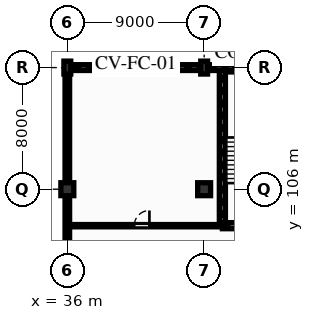
"""IFC4 building model, lengths in metres.
Left out: names, types, materials, properties, quantities, classifications, styles, units other than length and angle.
Written with IfcOpenShell. Run it as: python <this file> out.ifc"""

import sys

from ifc_helpers import new_model, si_unit, direction, frame, frame_2d, origin, origin_2d, place, context, subcontext, project, spatial, rectangle, extrude, element, fill, save


model = new_model("IFC4")
c1 = context("Model", 3, precision=1e-05, world=origin(), true_north=direction((0.0, 1.0)))
c2 = subcontext(c1, "Body", "Model", "MODEL_VIEW")
j1 = project(units=[si_unit("LENGTHUNIT", "METRE"), si_unit("PLANEANGLEUNIT", "RADIAN")], contexts=[c1])
p1 = place(None, origin())
s1 = spatial("IfcSite", under=j1, at=p1, CompositionType="ELEMENT")
p2 = place(p1, origin())
s2 = spatial("IfcBuilding", under=s1, at=p2, CompositionType="ELEMENT")
p3 = place(p2, frame((0.0, 0.0, 5.1)))
s3 = spatial("IfcBuildingStorey", under=s2, at=p3, CompositionType="ELEMENT", Elevation=5.1)
p4 = place(p3, frame((36.0, 106.0, 0.0), z_axis=(0.0, 0.0, 1.0), x_axis=(1.0, 0.0, 0.0)))
e1 = element("IfcColumn", 1, at=p4, inside=s3, PredefinedType="COLUMN", context=c2, shape_type="SweptSolid", body=[
    extrude(rectangle(XDim=0.85, YDim=0.85, at=origin_2d()), origin(), (0.0, 0.0, 1.0), 3.84),
])
p5 = place(p3, frame((36.0, 114.0, 0.0), z_axis=(0.0, 0.0, 1.0), x_axis=(0.0, 1.0, 0.0)))
e2 = element("IfcColumn", 2, at=p5, inside=s3, PredefinedType="COLUMN", context=c2, shape_type="SweptSolid", body=[
    extrude(rectangle(XDim=0.45, YDim=0.85, at=origin_2d()), origin(), (0.0, 0.0, 1.0), 3.84),
])
p6 = place(p3, frame((45.0, 106.0, 0.0), z_axis=(0.0, 0.0, 1.0), x_axis=(1.0, 0.0, 0.0)))
e3 = element("IfcColumn", 3, at=p6, inside=s3, PredefinedType="COLUMN", context=c2, shape_type="SweptSolid", body=[
    extrude(rectangle(XDim=0.85, YDim=0.85, at=origin_2d()), origin(), (0.0, 0.0, 1.0), 3.84),
])
p7 = place(p3, frame((45.0, 114.0, 0.0), z_axis=(0.0, 0.0, 1.0), x_axis=(0.0, 1.0, 0.0)))
e4 = element("IfcColumn", 4, at=p7, inside=s3, PredefinedType="COLUMN", context=c2, shape_type="SweptSolid", body=[
    extrude(rectangle(XDim=0.45, YDim=0.85, at=origin_2d()), origin(), (0.0, 0.0, 1.0), 3.84),
])
p8 = place(p3, frame((36.0, 114.0, 0.0), z_axis=(0.0, 0.0, 1.0), x_axis=(1.0, 0.0, 0.0)))
e5 = element("IfcWall", 5, at=p8, inside=s3, PredefinedType="SOLIDWALL", context=c2, shape_type="SweptSolid", body=[
    extrude(rectangle(XDim=9.0, YDim=0.38, at=frame_2d((4.5, 0.0))), origin(), (0.0, 0.0, 1.0), 3.55),
])
p9 = place(p8, frame((2.2, 0.0, 0.615)))
e6 = element("IfcOpeningElement", 6, at=p9, cuts=e5, PredefinedType="OPENING", context=c2, shape_type="SweptSolid", body=[
    extrude(rectangle(XDim=0.75, YDim=2.2, at=frame_2d((0.375, 1.1))), frame((0.0, 0.2, 0.0), z_axis=(0.0, -1.0, 0.0), x_axis=(1.0, 0.0, 0.0)), (0.0, 0.0, 1.0), 0.4),
])
p10 = place(p8, frame((5.4, 0.0, 0.615)))
e7 = element("IfcOpeningElement", 7, at=p10, cuts=e5, PredefinedType="OPENING", context=c2, shape_type="SweptSolid", body=[
    extrude(rectangle(XDim=0.9, YDim=2.2, at=frame_2d((0.45, 1.1))), frame((0.0, 0.2, 0.0), z_axis=(0.0, -1.0, 0.0), x_axis=(1.0, 0.0, 0.0)), (0.0, 0.0, 1.0), 0.4),
])
p11 = place(p3, frame((45.0, 114.0, 0.0), z_axis=(0.0, 0.0, 1.0), x_axis=(1.0, 0.0, 0.0)))
e8 = element("IfcWall", 8, at=p11, inside=s3, PredefinedType="SOLIDWALL", context=c2, shape_type="SweptSolid", body=[
    extrude(rectangle(XDim=9.0, YDim=0.38, at=frame_2d((4.5, 0.0))), origin(), (0.0, 0.0, 1.0), 3.55),
])
p12 = place(p3, frame((36.0, 82.2, 0.0), z_axis=(0.0, 0.0, 1.0), x_axis=(0.0, 1.0, 0.0)))
e9 = element("IfcWall", 9, at=p12, inside=s3, PredefinedType="SOLIDWALL", context=c2, shape_type="SweptSolid", body=[
    extrude(rectangle(XDim=31.8, YDim=0.3, at=frame_2d((15.9, 0.0))), origin(), (0.0, 0.0, 1.0), 2.855),
])
p13 = place(p12, frame((3.0, 0.0, 0.885)))
e10 = element("IfcOpeningElement", 10, at=p13, cuts=e9, PredefinedType="OPENING", context=c2, shape_type="SweptSolid", body=[
    extrude(rectangle(XDim=1.35, YDim=1.85, at=frame_2d((0.675, 0.925))), frame((0.0, 0.16, 0.0), z_axis=(0.0, -1.0, 0.0), x_axis=(1.0, 0.0, 0.0)), (0.0, 0.0, 1.0), 0.32),
])
p14 = place(p12, frame((9.5, 0.0, 0.95)))
e11 = element("IfcOpeningElement", 11, at=p14, cuts=e9, PredefinedType="OPENING", context=c2, shape_type="SweptSolid", body=[
    extrude(rectangle(XDim=1.05, YDim=1.75, at=frame_2d((0.525, 0.875))), frame((0.0, 0.16, 0.0), z_axis=(0.0, -1.0, 0.0), x_axis=(1.0, 0.0, 0.0)), (0.0, 0.0, 1.0), 0.32),
])
p15 = place(p12, frame((16.5, 0.0, 0.635)))
e12 = element("IfcOpeningElement", 12, at=p15, cuts=e9, PredefinedType="OPENING", context=c2, shape_type="SweptSolid", body=[
    extrude(rectangle(XDim=1.5, YDim=2.1, at=frame_2d((0.75, 1.05))), frame((0.0, 0.16, 0.0), z_axis=(0.0, -1.0, 0.0), x_axis=(1.0, 0.0, 0.0)), (0.0, 0.0, 1.0), 0.32),
])
p16 = place(p3, frame((46.2, 103.6, 0.0), z_axis=(0.0, 0.0, 1.0), x_axis=(1.0, 0.0, 0.0)))
e13 = element("IfcWall", 13, at=p16, inside=s3, PredefinedType="SHEAR", context=c2, shape_type="SweptSolid", body=[
    extrude(rectangle(XDim=13.2, YDim=0.4, at=frame_2d((6.6, 0.0))), origin(), (0.0, 0.0, 1.0), 3.55),
])
p17 = place(p16, frame((5.8, 0.0, 0.0)))
e14 = element("IfcOpeningElement", 14, at=p17, cuts=e13, PredefinedType="OPENING", context=c2, shape_type="SweptSolid", body=[
    extrude(rectangle(XDim=1.5, YDim=2.2, at=frame_2d((0.75, 1.1))), frame((0.0, 0.21, 0.0), z_axis=(0.0, -1.0, 0.0), x_axis=(1.0, 0.0, 0.0)), (0.0, 0.0, 1.0), 0.42),
])
p18 = place(p3, frame((46.2, 103.8, 0.0), z_axis=(0.0, 0.0, 1.0), x_axis=(0.0, 1.0, 0.0)))
e15 = element("IfcWall", 15, at=p18, inside=s3, PredefinedType="SHEAR", context=c2, shape_type="SweptSolid", body=[
    extrude(rectangle(XDim=10.01, YDim=0.4, at=frame_2d((5.005, 0.0))), origin(), (0.0, 0.0, 1.0), 3.55),
])
p19 = place(p3, frame((36.0, 103.6, 0.0), z_axis=(0.0, 0.0, 1.0), x_axis=(1.0, 0.0, 0.0)))
e16 = element("IfcWall", 16, at=p19, inside=s3, PredefinedType="PARTITIONING", context=c2, shape_type="SweptSolid", body=[
    extrude(rectangle(XDim=10.2, YDim=0.15, at=frame_2d((5.1, 0.0))), origin(), (0.0, 0.0, 1.0), 3.55),
])
p20 = place(p19, frame((4.4, 0.0, 0.0)))
e17 = element("IfcOpeningElement", 17, at=p20, cuts=e16, PredefinedType="OPENING", context=c2, shape_type="SweptSolid", body=[
    extrude(rectangle(XDim=1.0, YDim=2.15, at=frame_2d((0.5, 1.075))), frame((0.0, 0.085, 0.0), z_axis=(0.0, -1.0, 0.0), x_axis=(1.0, 0.0, 0.0)), (0.0, 0.0, 1.0), 0.17),
])
p21 = place(p9, origin())
e18 = element("IfcWindow", 18, at=p21, inside=s3, PartitioningType="SINGLE_PANEL", PredefinedType="WINDOW", context=c2, shape_type="SweptSolid", body=[
    extrude(rectangle(XDim=0.75, YDim=2.2, at=frame_2d((0.375, 1.1))), frame((0.0, 0.03, 0.0), z_axis=(0.0, -1.0, 0.0), x_axis=(1.0, 0.0, 0.0)), (0.0, 0.0, 1.0), 0.06),
])
fill(e6, e18)
p22 = place(p10, origin())
e19 = element("IfcWindow", 19, at=p22, inside=s3, PartitioningType="SINGLE_PANEL", PredefinedType="WINDOW", context=c2, shape_type="SweptSolid", body=[
    extrude(rectangle(XDim=0.9, YDim=2.2, at=frame_2d((0.45, 1.1))), frame((0.0, 0.03, 0.0), z_axis=(0.0, -1.0, 0.0), x_axis=(1.0, 0.0, 0.0)), (0.0, 0.0, 1.0), 0.06),
])
fill(e7, e19)
p23 = place(p20, origin())
e20 = element("IfcDoor", 20, at=p23, inside=s3, OperationType="SINGLE_SWING_RIGHT", PredefinedType="DOOR", context=c2, shape_type="SweptSolid", body=[
    extrude(rectangle(XDim=1.0, YDim=2.15, at=frame_2d((0.5, 1.075))), frame((0.0, 0.025, 0.0), z_axis=(0.0, -1.0, 0.0), x_axis=(1.0, 0.0, 0.0)), (0.0, 0.0, 1.0), 0.05),
])
fill(e17, e20)
save(model, sys.argv[1])
